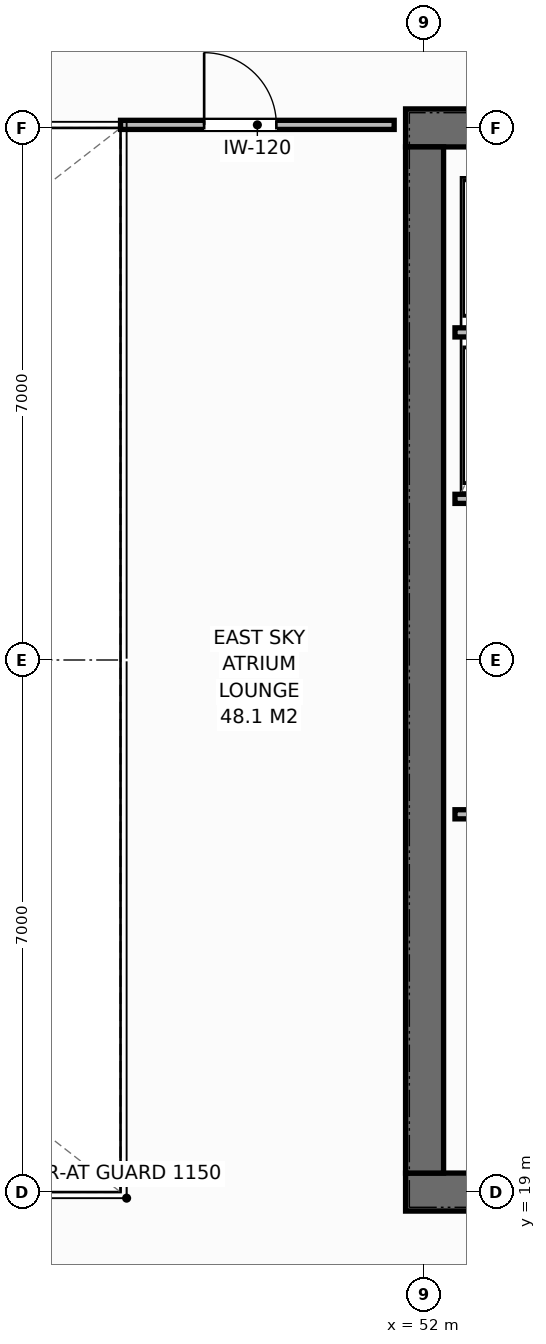
"""IFC4 building model, lengths in metres.
Left out: names, types, materials, properties, quantities, classifications, styles, units other than length and angle.
Written with IfcOpenShell. Run it as: python <this file> out.ifc"""

import sys

from ifc_helpers import new_model, si_unit, direction, frame, frame_2d, origin, place, context, subcontext, project, spatial, rectangle, extrude, element, fill, save


model = new_model("IFC4")
c1 = context("Model", 3, precision=1e-05, world=origin(), true_north=direction((0.0, 1.0)))
c2 = subcontext(c1, "Body", "Model", "MODEL_VIEW")
j1 = project(units=[si_unit("LENGTHUNIT", "METRE"), si_unit("PLANEANGLEUNIT", "RADIAN")], contexts=[c1])
p1 = place(None, origin())
s1 = spatial("IfcSite", under=j1, at=p1, CompositionType="ELEMENT")
p2 = place(p1, origin())
s2 = spatial("IfcBuilding", under=s1, at=p2, CompositionType="ELEMENT")
p3 = place(p2, frame((0.0, 0.0, 236.6)))
s3 = spatial("IfcBuildingStorey", under=s2, at=p3, CompositionType="ELEMENT", Elevation=236.6)
p4 = place(p3, frame((51.75, 19.0, 0.0), z_axis=(0.0, 0.0, 1.0), x_axis=(1.0, 0.0, 0.0)))
e1 = element("IfcWall", 1, at=p4, inside=s3, PredefinedType="SHEAR", context=c2, shape_type="SweptSolid", body=[
    extrude(rectangle(XDim=13.5, YDim=0.5, at=frame_2d((6.75, 0.0))), origin(), (0.0, 0.0, 1.0), 3.8),
])
p5 = place(p4, frame((2.97, 0.0, 0.0)))
e2 = element("IfcOpeningElement", 2, at=p5, cuts=e1, PredefinedType="OPENING", context=c2, shape_type="SweptSolid", body=[
    extrude(rectangle(XDim=1.4, YDim=2.2, at=frame_2d((0.7, 1.1))), frame((0.0, 0.26, 0.0), z_axis=(0.0, -1.0, 0.0), x_axis=(1.0, 0.0, 0.0)), (0.0, 0.0, 1.0), 0.52),
])
p6 = place(p3, frame((51.75, 33.0, 0.0), z_axis=(0.0, 0.0, 1.0), x_axis=(1.0, 0.0, 0.0)))
e3 = element("IfcWall", 3, at=p6, inside=s3, PredefinedType="SHEAR", context=c2, shape_type="SweptSolid", body=[
    extrude(rectangle(XDim=13.5, YDim=0.5, at=frame_2d((6.75, 0.0))), origin(), (0.0, 0.0, 1.0), 3.8),
])
p7 = place(p6, frame((2.97, 0.0, 0.0)))
e4 = element("IfcOpeningElement", 4, at=p7, cuts=e3, PredefinedType="OPENING", context=c2, shape_type="SweptSolid", body=[
    extrude(rectangle(XDim=1.4, YDim=2.2, at=frame_2d((0.7, 1.1))), frame((0.0, 0.26, 0.0), z_axis=(0.0, -1.0, 0.0), x_axis=(1.0, 0.0, 0.0)), (0.0, 0.0, 1.0), 0.52),
])
p8 = place(p6, frame((10.85, 0.0, 0.0)))
e5 = element("IfcOpeningElement", 5, at=p8, cuts=e3, PredefinedType="OPENING", context=c2, shape_type="SweptSolid", body=[
    extrude(rectangle(XDim=0.9, YDim=2.15, at=frame_2d((0.45, 1.075))), frame((0.0, 0.26, 0.0), z_axis=(0.0, -1.0, 0.0), x_axis=(1.0, 0.0, 0.0)), (0.0, 0.0, 1.0), 0.52),
])
p9 = place(p6, frame((5.8, 0.0, 0.0)))
e6 = element("IfcOpeningElement", 6, at=p9, cuts=e3, PredefinedType="OPENING", context=c2, shape_type="SweptSolid", body=[
    extrude(rectangle(XDim=0.9, YDim=2.15, at=frame_2d((0.45, 1.075))), frame((0.0, 0.26, 0.0), z_axis=(0.0, -1.0, 0.0), x_axis=(1.0, 0.0, 0.0)), (0.0, 0.0, 1.0), 0.52),
])
p10 = place(p6, frame((8.2, 0.0, 0.0)))
e7 = element("IfcOpeningElement", 7, at=p10, cuts=e3, PredefinedType="OPENING", context=c2, shape_type="SweptSolid", body=[
    extrude(rectangle(XDim=0.95, YDim=2.15, at=frame_2d((0.475, 1.075))), frame((0.0, 0.26, 0.0), z_axis=(0.0, -1.0, 0.0), x_axis=(1.0, 0.0, 0.0)), (0.0, 0.0, 1.0), 0.52),
])
p11 = place(p3, frame((52.0, 19.25, 0.0), z_axis=(0.0, 0.0, 1.0), x_axis=(0.0, 1.0, 0.0)))
e8 = element("IfcWall", 8, at=p11, inside=s3, PredefinedType="SHEAR", context=c2, shape_type="SweptSolid", body=[
    extrude(rectangle(XDim=13.5, YDim=0.5, at=frame_2d((6.75, 0.0))), origin(), (0.0, 0.0, 1.0), 3.8),
])
for number, where, z_axis, x_axis in (
    (9, (52.4, 23.97, 0.0), (0.0, 0.0, 1.0), (1.0, 0.0, 0.0)),
    (10, (52.4, 28.12, 0.0), (0.0, 0.0, 1.0), (1.0, 0.0, 0.0)),
    (11, (52.4, 30.31, 0.0), (0.0, 0.0, 1.0), (1.0, 0.0, 0.0)),
):
    element("IfcWall", number, at=place(p3, frame(where, z_axis=z_axis, x_axis=x_axis)), inside=s3, PredefinedType="PARTITIONING", context=c2, shape_type="SweptSolid", body=[
        extrude(rectangle(XDim=2.2, YDim=0.12, at=frame_2d((1.1, 0.0))), origin(), (0.0, 0.0, 1.0), 3.58),
    ])
p12 = place(p3, frame((48.0, 33.04, 0.0), z_axis=(0.0, 0.0, 1.0), x_axis=(1.0, 0.0, 0.0)))
e12 = element("IfcWall", 12, at=p12, inside=s3, PredefinedType="PARTITIONING", context=c2, shape_type="SweptSolid", body=[
    extrude(rectangle(XDim=3.6, YDim=0.12, at=frame_2d((1.8, 0.0))), origin(), (0.0, 0.0, 1.0), 3.32),
])
p13 = place(p12, frame((1.1, 0.0, 0.0)))
e13 = element("IfcOpeningElement", 13, at=p13, cuts=e12, PredefinedType="OPENING", context=c2, shape_type="SweptSolid", body=[
    extrude(rectangle(XDim=0.95, YDim=2.15, at=frame_2d((0.475, 1.075))), frame((0.0, 0.07, 0.0), z_axis=(0.0, -1.0, 0.0), x_axis=(1.0, 0.0, 0.0)), (0.0, 0.0, 1.0), 0.14),
])
p14 = place(p13, origin())
e14 = element("IfcDoor", 14, at=p14, inside=s3, OperationType="SINGLE_SWING_LEFT", PredefinedType="DOOR", context=c2, shape_type="SweptSolid", body=[
    extrude(rectangle(XDim=0.95, YDim=2.15, at=frame_2d((0.475, 1.075))), frame((0.0, 0.025, 0.0), z_axis=(0.0, -1.0, 0.0), x_axis=(1.0, 0.0, 0.0)), (0.0, 0.0, 1.0), 0.05),
])
fill(e13, e14)
save(model, sys.argv[1])
